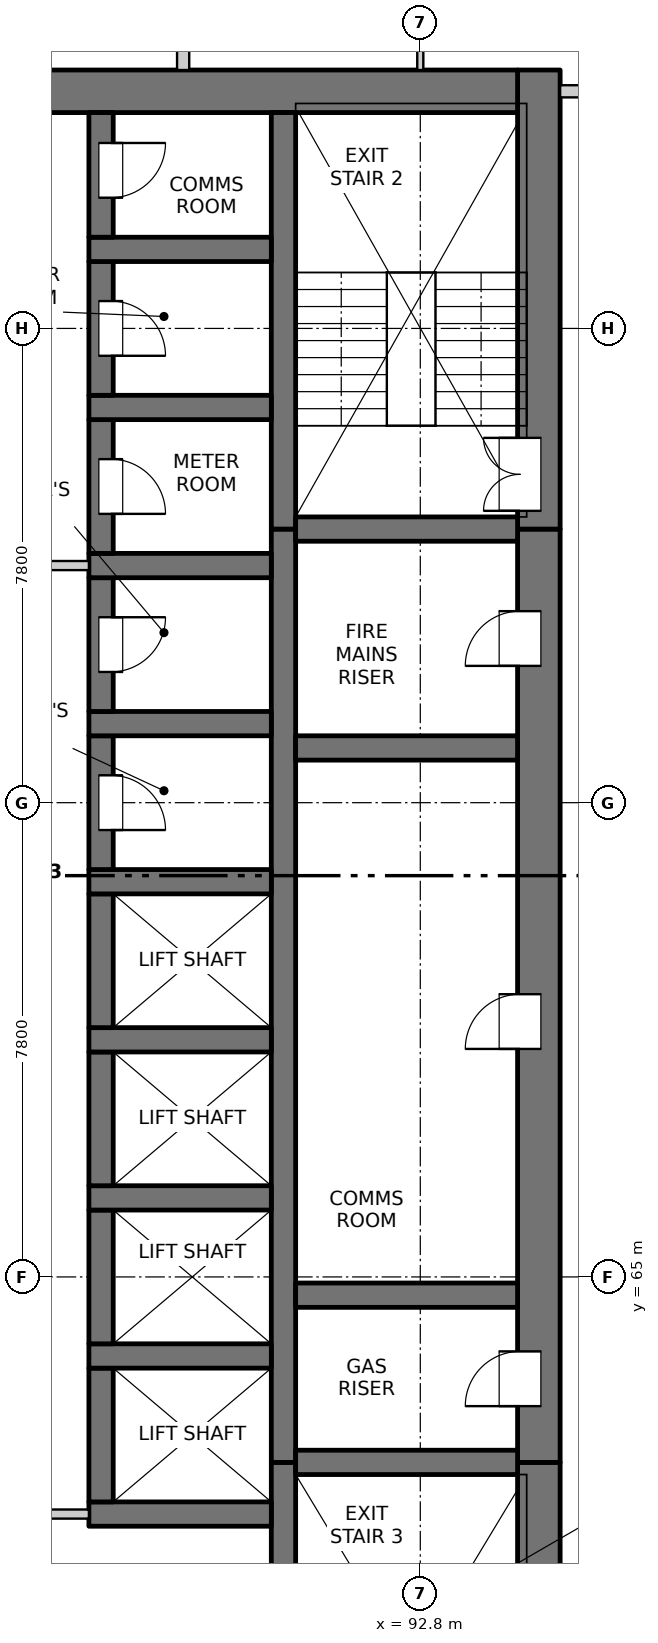
"""IFC4 building model, lengths in metres.
Left out: names, types, materials, properties, quantities, classifications, styles, units other than length and angle.
Written with IfcOpenShell. Run it as: python <this file> out.ifc"""

import sys

from ifc_helpers import new_model, si_unit, direction, frame, frame_2d, origin, place, context, subcontext, project, spatial, rectangle, extrude, element, fill, save


model = new_model("IFC4")
c1 = context("Model", 3, precision=1e-05, world=origin(), true_north=direction((0.0, 1.0)))
c2 = subcontext(c1, "Body", "Model", "MODEL_VIEW")
j1 = project(units=[si_unit("LENGTHUNIT", "METRE"), si_unit("PLANEANGLEUNIT", "RADIAN")], contexts=[c1])
p1 = place(None, origin())
s1 = spatial("IfcSite", under=j1, at=p1, CompositionType="ELEMENT")
p2 = place(p1, origin())
s2 = spatial("IfcBuilding", under=s1, at=p2, CompositionType="ELEMENT")
p3 = place(p2, frame((0.0, 0.0, 26.3)))
s3 = spatial("IfcBuildingStorey", under=s2, at=p3, CompositionType="ELEMENT", Elevation=26.3)
p4 = place(p3, frame((94.75, 54.9, -0.25), z_axis=(0.0, 0.0, 1.0), x_axis=(0.0, 1.0, 0.0)))
e1 = element("IfcWall", 1, at=p4, inside=s3, PredefinedType="SOLIDWALL", context=c2, shape_type="SweptSolid", body=[
    extrude(rectangle(XDim=7.05, YDim=0.7, at=frame_2d((3.525, 0.0))), origin(), (0.0, 0.0, 1.0), 3.4),
])
p5 = place(p4, frame((0.75, 0.0, 0.25)))
e2 = element("IfcOpeningElement", 2, at=p5, cuts=e1, PredefinedType="OPENING", context=c2, shape_type="SweptSolid", body=[
    extrude(rectangle(XDim=1.2, YDim=2.1, at=frame_2d((0.6, 1.05))), frame((0.0, 0.36, 0.0), z_axis=(0.0, -1.0, 0.0), x_axis=(1.0, 0.0, 0.0)), (0.0, 0.0, 1.0), 0.72),
])
p6 = place(p3, frame((94.75, 61.95, -0.25), z_axis=(0.0, 0.0, 1.0), x_axis=(0.0, 1.0, 0.0)))
e3 = element("IfcWall", 3, at=p6, inside=s3, PredefinedType="SOLIDWALL", context=c2, shape_type="SweptSolid", body=[
    extrude(rectangle(XDim=15.35, YDim=0.7, at=frame_2d((7.675, 0.0))), origin(), (0.0, 0.0, 1.0), 3.4),
])
p7 = place(p6, frame((0.925, 0.0, 0.25)))
e4 = element("IfcOpeningElement", 4, at=p7, cuts=e3, PredefinedType="OPENING", context=c2, shape_type="SweptSolid", body=[
    extrude(rectangle(XDim=0.9, YDim=2.1, at=frame_2d((0.45, 1.05))), frame((0.0, 0.36, 0.0), z_axis=(0.0, -1.0, 0.0), x_axis=(1.0, 0.0, 0.0)), (0.0, 0.0, 1.0), 0.72),
])
p8 = place(p6, frame((6.8, 0.0, 0.25)))
e5 = element("IfcOpeningElement", 5, at=p8, cuts=e3, PredefinedType="OPENING", context=c2, shape_type="SweptSolid", body=[
    extrude(rectangle(XDim=0.9, YDim=2.1, at=frame_2d((0.45, 1.05))), frame((0.0, 0.36, 0.0), z_axis=(0.0, -1.0, 0.0), x_axis=(1.0, 0.0, 0.0)), (0.0, 0.0, 1.0), 0.72),
])
p9 = place(p6, frame((13.1, 0.0, 0.25)))
e6 = element("IfcOpeningElement", 6, at=p9, cuts=e3, PredefinedType="OPENING", context=c2, shape_type="SweptSolid", body=[
    extrude(rectangle(XDim=0.9, YDim=2.1, at=frame_2d((0.45, 1.05))), frame((0.0, 0.36, 0.0), z_axis=(0.0, -1.0, 0.0), x_axis=(1.0, 0.0, 0.0)), (0.0, 0.0, 1.0), 0.72),
])
p10 = place(p3, frame((94.75, 77.3, -0.25), z_axis=(0.0, 0.0, 1.0), x_axis=(0.0, 1.0, 0.0)))
e7 = element("IfcWall", 7, at=p10, inside=s3, PredefinedType="SOLIDWALL", context=c2, shape_type="SweptSolid", body=[
    extrude(rectangle(XDim=7.55, YDim=0.7, at=frame_2d((3.775, 0.0))), origin(), (0.0, 0.0, 1.0), 3.4),
])
p11 = place(p10, frame((0.3, 0.0, 0.25)))
e8 = element("IfcOpeningElement", 8, at=p11, cuts=e7, PredefinedType="OPENING", context=c2, shape_type="SweptSolid", body=[
    extrude(rectangle(XDim=1.2, YDim=2.1, at=frame_2d((0.6, 1.05))), frame((0.0, 0.36, 0.0), z_axis=(0.0, -1.0, 0.0), x_axis=(1.0, 0.0, 0.0)), (0.0, 0.0, 1.0), 0.72),
])
p12 = place(p3, frame((75.6, 84.5, -0.25), z_axis=(0.0, 0.0, 1.0), x_axis=(1.0, 0.0, 0.0)))
e9 = element("IfcWall", 9, at=p12, inside=s3, PredefinedType="SOLIDWALL", context=c2, shape_type="SweptSolid", body=[
    extrude(rectangle(XDim=18.8, YDim=0.7, at=frame_2d((9.4, 0.0))), origin(), (0.0, 0.0, 1.0), 3.4),
])
p13 = place(p3, frame((90.55, 55.6, -0.25), z_axis=(0.0, 0.0, 1.0), x_axis=(0.0, 1.0, 0.0)))
e10 = element("IfcWall", 10, at=p13, inside=s3, PredefinedType="SOLIDWALL", context=c2, shape_type="SweptSolid", body=[
    extrude(rectangle(XDim=6.35, YDim=0.4, at=frame_2d((3.175, 0.0))), origin(), (0.0, 0.0, 1.0), 3.4),
])
p14 = place(p3, frame((90.55, 61.95, -0.25), z_axis=(0.0, 0.0, 1.0), x_axis=(0.0, 1.0, 0.0)))
e11 = element("IfcWall", 11, at=p14, inside=s3, PredefinedType="SOLIDWALL", context=c2, shape_type="SweptSolid", body=[
    extrude(rectangle(XDim=15.35, YDim=0.4, at=frame_2d((7.675, 0.0))), origin(), (0.0, 0.0, 1.0), 3.4),
])
p15 = place(p3, frame((90.55, 77.3, -0.25), z_axis=(0.0, 0.0, 1.0), x_axis=(0.0, 1.0, 0.0)))
e12 = element("IfcWall", 12, at=p15, inside=s3, PredefinedType="SOLIDWALL", context=c2, shape_type="SweptSolid", body=[
    extrude(rectangle(XDim=6.85, YDim=0.4, at=frame_2d((3.425, 0.0))), origin(), (0.0, 0.0, 1.0), 3.4),
])
p16 = place(p3, frame((87.35, 61.1, -0.25), z_axis=(0.0, 0.0, 1.0), x_axis=(1.0, 0.0, 0.0)))
e13 = element("IfcWall", 13, at=p16, inside=s3, PredefinedType="SOLIDWALL", context=c2, shape_type="SweptSolid", body=[
    extrude(rectangle(XDim=3.0, YDim=0.4, at=frame_2d((1.5, 0.0))), origin(), (0.0, 0.0, 1.0), 3.4),
])
p17 = place(p3, frame((87.55, 61.3, -0.25), z_axis=(0.0, 0.0, 1.0), x_axis=(0.0, 1.0, 0.0)))
e14 = element("IfcWall", 14, at=p17, inside=s3, PredefinedType="SOLIDWALL", context=c2, shape_type="SweptSolid", body=[
    extrude(rectangle(XDim=2.2, YDim=0.4, at=frame_2d((1.1, 0.0))), origin(), (0.0, 0.0, 1.0), 3.4),
])
p18 = place(p3, frame((87.35, 63.7, -0.25), z_axis=(0.0, 0.0, 1.0), x_axis=(1.0, 0.0, 0.0)))
e15 = element("IfcWall", 15, at=p18, inside=s3, PredefinedType="SOLIDWALL", context=c2, shape_type="SweptSolid", body=[
    extrude(rectangle(XDim=3.0, YDim=0.4, at=frame_2d((1.5, 0.0))), origin(), (0.0, 0.0, 1.0), 3.4),
])
p19 = place(p3, frame((87.55, 63.9, -0.25), z_axis=(0.0, 0.0, 1.0), x_axis=(0.0, 1.0, 0.0)))
e16 = element("IfcWall", 16, at=p19, inside=s3, PredefinedType="SOLIDWALL", context=c2, shape_type="SweptSolid", body=[
    extrude(rectangle(XDim=2.2, YDim=0.4, at=frame_2d((1.1, 0.0))), origin(), (0.0, 0.0, 1.0), 3.4),
])
p20 = place(p3, frame((87.35, 66.3, -0.25), z_axis=(0.0, 0.0, 1.0), x_axis=(1.0, 0.0, 0.0)))
e17 = element("IfcWall", 17, at=p20, inside=s3, PredefinedType="SOLIDWALL", context=c2, shape_type="SweptSolid", body=[
    extrude(rectangle(XDim=3.0, YDim=0.4, at=frame_2d((1.5, 0.0))), origin(), (0.0, 0.0, 1.0), 3.4),
])
p21 = place(p3, frame((87.55, 66.5, -0.25), z_axis=(0.0, 0.0, 1.0), x_axis=(0.0, 1.0, 0.0)))
e18 = element("IfcWall", 18, at=p21, inside=s3, PredefinedType="SOLIDWALL", context=c2, shape_type="SweptSolid", body=[
    extrude(rectangle(XDim=2.2, YDim=0.4, at=frame_2d((1.1, 0.0))), origin(), (0.0, 0.0, 1.0), 3.4),
])
p22 = place(p3, frame((87.35, 68.9, -0.25), z_axis=(0.0, 0.0, 1.0), x_axis=(1.0, 0.0, 0.0)))
e19 = element("IfcWall", 19, at=p22, inside=s3, PredefinedType="SOLIDWALL", context=c2, shape_type="SweptSolid", body=[
    extrude(rectangle(XDim=3.0, YDim=0.4, at=frame_2d((1.5, 0.0))), origin(), (0.0, 0.0, 1.0), 3.4),
])
p23 = place(p3, frame((87.55, 69.1, -0.25), z_axis=(0.0, 0.0, 1.0), x_axis=(0.0, 1.0, 0.0)))
e20 = element("IfcWall", 20, at=p23, inside=s3, PredefinedType="SOLIDWALL", context=c2, shape_type="SweptSolid", body=[
    extrude(rectangle(XDim=2.2, YDim=0.4, at=frame_2d((1.1, 0.0))), origin(), (0.0, 0.0, 1.0), 3.4),
])
p24 = place(p3, frame((87.35, 71.5, -0.25), z_axis=(0.0, 0.0, 1.0), x_axis=(1.0, 0.0, 0.0)))
e21 = element("IfcWall", 21, at=p24, inside=s3, PredefinedType="SOLIDWALL", context=c2, shape_type="SweptSolid", body=[
    extrude(rectangle(XDim=3.0, YDim=0.4, at=frame_2d((1.5, 0.0))), origin(), (0.0, 0.0, 1.0), 3.4),
])
p25 = place(p3, frame((87.55, 71.7, -0.25), z_axis=(0.0, 0.0, 1.0), x_axis=(0.0, 1.0, 0.0)))
e22 = element("IfcWall", 22, at=p25, inside=s3, PredefinedType="SOLIDWALL", context=c2, shape_type="SweptSolid", body=[
    extrude(rectangle(XDim=2.2, YDim=0.4, at=frame_2d((1.1, 0.0))), origin(), (0.0, 0.0, 1.0), 3.4),
])
p26 = place(p25, frame((0.65, 0.0, 0.25)))
e23 = element("IfcOpeningElement", 23, at=p26, cuts=e22, PredefinedType="OPENING", context=c2, shape_type="SweptSolid", body=[
    extrude(rectangle(XDim=0.9, YDim=2.1, at=frame_2d((0.45, 1.05))), frame((0.0, 0.21, 0.0), z_axis=(0.0, -1.0, 0.0), x_axis=(1.0, 0.0, 0.0)), (0.0, 0.0, 1.0), 0.42),
])
p27 = place(p3, frame((87.35, 74.1, -0.25), z_axis=(0.0, 0.0, 1.0), x_axis=(1.0, 0.0, 0.0)))
e24 = element("IfcWall", 24, at=p27, inside=s3, PredefinedType="SOLIDWALL", context=c2, shape_type="SweptSolid", body=[
    extrude(rectangle(XDim=3.0, YDim=0.4, at=frame_2d((1.5, 0.0))), origin(), (0.0, 0.0, 1.0), 3.4),
])
p28 = place(p3, frame((87.55, 74.3, -0.25), z_axis=(0.0, 0.0, 1.0), x_axis=(0.0, 1.0, 0.0)))
e25 = element("IfcWall", 25, at=p28, inside=s3, PredefinedType="SOLIDWALL", context=c2, shape_type="SweptSolid", body=[
    extrude(rectangle(XDim=2.2, YDim=0.4, at=frame_2d((1.1, 0.0))), origin(), (0.0, 0.0, 1.0), 3.4),
])
p29 = place(p28, frame((0.65, 0.0, 0.25)))
e26 = element("IfcOpeningElement", 26, at=p29, cuts=e25, PredefinedType="OPENING", context=c2, shape_type="SweptSolid", body=[
    extrude(rectangle(XDim=0.9, YDim=2.1, at=frame_2d((0.45, 1.05))), frame((0.0, 0.21, 0.0), z_axis=(0.0, -1.0, 0.0), x_axis=(1.0, 0.0, 0.0)), (0.0, 0.0, 1.0), 0.42),
])
p30 = place(p3, frame((87.35, 76.7, -0.25), z_axis=(0.0, 0.0, 1.0), x_axis=(1.0, 0.0, 0.0)))
e27 = element("IfcWall", 27, at=p30, inside=s3, PredefinedType="SOLIDWALL", context=c2, shape_type="SweptSolid", body=[
    extrude(rectangle(XDim=3.0, YDim=0.4, at=frame_2d((1.5, 0.0))), origin(), (0.0, 0.0, 1.0), 3.4),
])
p31 = place(p3, frame((87.55, 76.9, -0.25), z_axis=(0.0, 0.0, 1.0), x_axis=(0.0, 1.0, 0.0)))
e28 = element("IfcWall", 28, at=p31, inside=s3, PredefinedType="SOLIDWALL", context=c2, shape_type="SweptSolid", body=[
    extrude(rectangle(XDim=2.2, YDim=0.4, at=frame_2d((1.1, 0.0))), origin(), (0.0, 0.0, 1.0), 3.4),
])
p32 = place(p31, frame((0.65, 0.0, 0.25)))
e29 = element("IfcOpeningElement", 29, at=p32, cuts=e28, PredefinedType="OPENING", context=c2, shape_type="SweptSolid", body=[
    extrude(rectangle(XDim=0.9, YDim=2.1, at=frame_2d((0.45, 1.05))), frame((0.0, 0.21, 0.0), z_axis=(0.0, -1.0, 0.0), x_axis=(1.0, 0.0, 0.0)), (0.0, 0.0, 1.0), 0.42),
])
p33 = place(p3, frame((87.35, 79.3, -0.25), z_axis=(0.0, 0.0, 1.0), x_axis=(1.0, 0.0, 0.0)))
e30 = element("IfcWall", 30, at=p33, inside=s3, PredefinedType="SOLIDWALL", context=c2, shape_type="SweptSolid", body=[
    extrude(rectangle(XDim=3.0, YDim=0.4, at=frame_2d((1.5, 0.0))), origin(), (0.0, 0.0, 1.0), 3.4),
])
p34 = place(p3, frame((87.55, 79.5, -0.25), z_axis=(0.0, 0.0, 1.0), x_axis=(0.0, 1.0, 0.0)))
e31 = element("IfcWall", 31, at=p34, inside=s3, PredefinedType="SOLIDWALL", context=c2, shape_type="SweptSolid", body=[
    extrude(rectangle(XDim=2.2, YDim=0.4, at=frame_2d((1.1, 0.0))), origin(), (0.0, 0.0, 1.0), 3.4),
])
p35 = place(p34, frame((0.65, 0.0, 0.25)))
e32 = element("IfcOpeningElement", 32, at=p35, cuts=e31, PredefinedType="OPENING", context=c2, shape_type="SweptSolid", body=[
    extrude(rectangle(XDim=0.9, YDim=2.1, at=frame_2d((0.45, 1.05))), frame((0.0, 0.21, 0.0), z_axis=(0.0, -1.0, 0.0), x_axis=(1.0, 0.0, 0.0)), (0.0, 0.0, 1.0), 0.42),
])
p36 = place(p3, frame((87.35, 81.9, -0.25), z_axis=(0.0, 0.0, 1.0), x_axis=(1.0, 0.0, 0.0)))
e33 = element("IfcWall", 33, at=p36, inside=s3, PredefinedType="SOLIDWALL", context=c2, shape_type="SweptSolid", body=[
    extrude(rectangle(XDim=3.0, YDim=0.4, at=frame_2d((1.5, 0.0))), origin(), (0.0, 0.0, 1.0), 3.4),
])
p37 = place(p3, frame((87.55, 82.1, -0.25), z_axis=(0.0, 0.0, 1.0), x_axis=(0.0, 1.0, 0.0)))
e34 = element("IfcWall", 34, at=p37, inside=s3, PredefinedType="SOLIDWALL", context=c2, shape_type="SweptSolid", body=[
    extrude(rectangle(XDim=2.05, YDim=0.4, at=frame_2d((1.025, 0.0))), origin(), (0.0, 0.0, 1.0), 3.4),
])
p38 = place(p37, frame((0.65, 0.0, 0.25)))
e35 = element("IfcOpeningElement", 35, at=p38, cuts=e34, PredefinedType="OPENING", context=c2, shape_type="SweptSolid", body=[
    extrude(rectangle(XDim=0.9, YDim=2.1, at=frame_2d((0.45, 1.05))), frame((0.0, 0.21, 0.0), z_axis=(0.0, -1.0, 0.0), x_axis=(1.0, 0.0, 0.0)), (0.0, 0.0, 1.0), 0.42),
])
for number, where, z_axis, x_axis in (
    (36, (90.75, 61.95, -0.25), (0.0, 0.0, 1.0), (1.0, 0.0, 0.0)),
    (37, (90.75, 64.7, -0.25), (0.0, 0.0, 1.0), (1.0, 0.0, 0.0)),
    (38, (90.75, 73.7, -0.25), (0.0, 0.0, 1.0), (1.0, 0.0, 0.0)),
    (39, (90.75, 77.3, -0.25), (0.0, 0.0, 1.0), (1.0, 0.0, 0.0)),
):
    element("IfcWall", number, at=place(p3, frame(where, z_axis=z_axis, x_axis=x_axis)), inside=s3, PredefinedType="SOLIDWALL", context=c2, shape_type="SweptSolid", body=[
        extrude(rectangle(XDim=3.65, YDim=0.4, at=frame_2d((1.825, 0.0))), origin(), (0.0, 0.0, 1.0), 3.4),
    ])
p39 = place(p3, frame((82.65, 61.1, 0.0), z_axis=(0.0, 0.0, 1.0), x_axis=(1.0, 0.0, 0.0)))
e40 = element("IfcWall", 40, at=p39, inside=s3, PredefinedType="PARTITIONING", context=c2, shape_type="SweptSolid", body=[
    extrude(rectangle(XDim=4.7, YDim=0.15, at=frame_2d((2.35, 0.0))), origin(), (0.0, 0.0, 1.0), 3.15),
])
p40 = place(p39, frame((1.45, 0.0, 0.0)))
e41 = element("IfcOpeningElement", 41, at=p40, cuts=e40, PredefinedType="OPENING", context=c2, shape_type="SweptSolid", body=[
    extrude(rectangle(XDim=1.8, YDim=2.1, at=frame_2d((0.9, 1.05))), frame((0.0, 0.085, 0.0), z_axis=(0.0, -1.0, 0.0), x_axis=(1.0, 0.0, 0.0)), (0.0, 0.0, 1.0), 0.17),
])
p41 = place(p3, frame((82.65, 76.7, 0.0), z_axis=(0.0, 0.0, 1.0), x_axis=(1.0, 0.0, 0.0)))
e42 = element("IfcWall", 42, at=p41, inside=s3, PredefinedType="PARTITIONING", context=c2, shape_type="SweptSolid", body=[
    extrude(rectangle(XDim=4.7, YDim=0.15, at=frame_2d((2.35, 0.0))), origin(), (0.0, 0.0, 1.0), 3.15),
])
p42 = place(p41, frame((1.45, 0.0, 0.0)))
e43 = element("IfcOpeningElement", 43, at=p42, cuts=e42, PredefinedType="OPENING", context=c2, shape_type="SweptSolid", body=[
    extrude(rectangle(XDim=1.8, YDim=2.1, at=frame_2d((0.9, 1.05))), frame((0.0, 0.085, 0.0), z_axis=(0.0, -1.0, 0.0), x_axis=(1.0, 0.0, 0.0)), (0.0, 0.0, 1.0), 0.17),
])
p43 = place(p3, frame((95.1, 84.5, 0.0), z_axis=(0.0, 0.0, 1.0), x_axis=(1.0, 0.0, 0.0)))
e44 = element("IfcWall", 44, at=p43, inside=s3, PredefinedType="PARTITIONING", context=c2, shape_type="SweptSolid", body=[
    extrude(rectangle(XDim=1.7, YDim=0.2, at=frame_2d((0.85, 0.0))), origin(), (0.0, 0.0, 1.0), 3.15),
])
p44 = place(p3, frame((88.9, 84.85, 0.0), z_axis=(0.0, 0.0, 1.0), x_axis=(0.0, 1.0, 0.0)))
e45 = element("IfcWall", 45, at=p44, inside=s3, PredefinedType="PARTITIONING", context=c2, shape_type="SweptSolid", body=[
    extrude(rectangle(XDim=3.25, YDim=0.2, at=frame_2d((1.625, 0.0))), origin(), (0.0, 0.0, 1.0), 3.15),
])
p45 = place(p3, frame((92.8, 84.85, 0.0), z_axis=(0.0, 0.0, 1.0), x_axis=(0.0, 1.0, 0.0)))
e46 = element("IfcWall", 46, at=p45, inside=s3, PredefinedType="PARTITIONING", context=c2, shape_type="SweptSolid", body=[
    extrude(rectangle(XDim=3.25, YDim=0.1, at=frame_2d((1.625, 0.0))), origin(), (0.0, 0.0, 1.0), 3.15),
])
p46 = place(p45, frame((1.15, 0.0, 0.0)))
e47 = element("IfcOpeningElement", 47, at=p46, cuts=e46, PredefinedType="OPENING", context=c2, shape_type="SweptSolid", body=[
    extrude(rectangle(XDim=0.9, YDim=2.1, at=frame_2d((0.45, 1.05))), frame((0.0, 0.06, 0.0), z_axis=(0.0, -1.0, 0.0), x_axis=(1.0, 0.0, 0.0)), (0.0, 0.0, 1.0), 0.12),
])
p47 = place(p7, origin())
e48 = element("IfcDoor", 48, at=p47, inside=s3, OperationType="SINGLE_SWING_LEFT", PredefinedType="DOOR", context=c2, shape_type="SweptSolid", body=[
    extrude(rectangle(XDim=0.9, YDim=2.1, at=frame_2d((0.45, 1.05))), frame((0.0, 0.335, 0.0), z_axis=(0.0, -1.0, 0.0), x_axis=(1.0, 0.0, 0.0)), (0.0, 0.0, 1.0), 0.05),
])
fill(e4, e48)
p48 = place(p8, origin())
e49 = element("IfcDoor", 49, at=p48, inside=s3, OperationType="SINGLE_SWING_LEFT", PredefinedType="DOOR", context=c2, shape_type="SweptSolid", body=[
    extrude(rectangle(XDim=0.9, YDim=2.1, at=frame_2d((0.45, 1.05))), frame((0.0, 0.335, 0.0), z_axis=(0.0, -1.0, 0.0), x_axis=(1.0, 0.0, 0.0)), (0.0, 0.0, 1.0), 0.05),
])
fill(e5, e49)
p49 = place(p26, origin())
e50 = element("IfcDoor", 50, at=p49, inside=s3, OperationType="SINGLE_SWING_RIGHT", PredefinedType="DOOR", context=c2, shape_type="SweptSolid", body=[
    extrude(rectangle(XDim=0.9, YDim=2.1, at=frame_2d((0.45, 1.05))), frame((0.0, -0.135, 0.0), z_axis=(0.0, -1.0, 0.0), x_axis=(1.0, 0.0, 0.0)), (0.0, 0.0, 1.0), 0.05),
])
fill(e23, e50)
p50 = place(p29, origin())
e51 = element("IfcDoor", 51, at=p50, inside=s3, OperationType="SINGLE_SWING_LEFT", PredefinedType="DOOR", context=c2, shape_type="SweptSolid", body=[
    extrude(rectangle(XDim=0.9, YDim=2.1, at=frame_2d((0.45, 1.05))), frame((0.0, -0.135, 0.0), z_axis=(0.0, -1.0, 0.0), x_axis=(1.0, 0.0, 0.0)), (0.0, 0.0, 1.0), 0.05),
])
fill(e26, e51)
p51 = place(p9, origin())
e52 = element("IfcDoor", 52, at=p51, inside=s3, OperationType="SINGLE_SWING_LEFT", PredefinedType="DOOR", context=c2, shape_type="SweptSolid", body=[
    extrude(rectangle(XDim=0.9, YDim=2.1, at=frame_2d((0.45, 1.05))), frame((0.0, 0.335, 0.0), z_axis=(0.0, -1.0, 0.0), x_axis=(1.0, 0.0, 0.0)), (0.0, 0.0, 1.0), 0.05),
])
fill(e6, e52)
p52 = place(p32, origin())
e53 = element("IfcDoor", 53, at=p52, inside=s3, OperationType="SINGLE_SWING_RIGHT", PredefinedType="DOOR", context=c2, shape_type="SweptSolid", body=[
    extrude(rectangle(XDim=0.9, YDim=2.1, at=frame_2d((0.45, 1.05))), frame((0.0, -0.135, 0.0), z_axis=(0.0, -1.0, 0.0), x_axis=(1.0, 0.0, 0.0)), (0.0, 0.0, 1.0), 0.05),
])
fill(e29, e53)
p53 = place(p11, origin())
e54 = element("IfcDoor", 54, at=p53, inside=s3, OperationType="DOUBLE_DOOR_SINGLE_SWING", PredefinedType="DOOR", context=c2, shape_type="SweptSolid", body=[
    extrude(rectangle(XDim=1.2, YDim=2.1, at=frame_2d((0.6, 1.05))), frame((0.0, 0.335, 0.0), z_axis=(0.0, -1.0, 0.0), x_axis=(1.0, 0.0, 0.0)), (0.0, 0.0, 1.0), 0.05),
])
fill(e8, e54)
p54 = place(p35, origin())
e55 = element("IfcDoor", 55, at=p54, inside=s3, OperationType="SINGLE_SWING_RIGHT", PredefinedType="DOOR", context=c2, shape_type="SweptSolid", body=[
    extrude(rectangle(XDim=0.9, YDim=2.1, at=frame_2d((0.45, 1.05))), frame((0.0, -0.135, 0.0), z_axis=(0.0, -1.0, 0.0), x_axis=(1.0, 0.0, 0.0)), (0.0, 0.0, 1.0), 0.05),
])
fill(e32, e55)
p55 = place(p38, origin())
e56 = element("IfcDoor", 56, at=p55, inside=s3, OperationType="SINGLE_SWING_LEFT", PredefinedType="DOOR", context=c2, shape_type="SweptSolid", body=[
    extrude(rectangle(XDim=0.9, YDim=2.1, at=frame_2d((0.45, 1.05))), frame((0.0, -0.135, 0.0), z_axis=(0.0, -1.0, 0.0), x_axis=(1.0, 0.0, 0.0)), (0.0, 0.0, 1.0), 0.05),
])
fill(e35, e56)
save(model, sys.argv[1])
